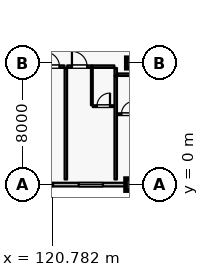
"""IFC4 building model, lengths in metres.
Left out: names, types, materials, properties, quantities, classifications, styles, units other than length and angle.
Written with IfcOpenShell. Run it as: python <this file> out.ifc"""

import sys

from ifc_helpers import new_model, si_unit, direction, frame, frame_2d, origin, origin_2d, place, context, subcontext, project, spatial, rectangle, extrude, element, fill, save


model = new_model("IFC4")
c1 = context("Model", 3, precision=1e-05, world=origin(), true_north=direction((0.0, 1.0)))
c2 = subcontext(c1, "Body", "Model", "MODEL_VIEW")
j1 = project(units=[si_unit("LENGTHUNIT", "METRE"), si_unit("PLANEANGLEUNIT", "RADIAN")], contexts=[c1])
p1 = place(None, origin())
s1 = spatial("IfcSite", under=j1, at=p1, CompositionType="ELEMENT")
p2 = place(p1, origin())
s2 = spatial("IfcBuilding", under=s1, at=p2, CompositionType="ELEMENT")
p3 = place(p2, frame((0.0, 0.0, 16.2)))
s3 = spatial("IfcBuildingStorey", under=s2, at=p3, CompositionType="ELEMENT", Elevation=16.2)
p4 = place(p3, frame((126.0, 0.0, 0.0), z_axis=(0.0, 0.0, 1.0), x_axis=(1.0, 0.0, 0.0)))
e1 = element("IfcColumn", 1, at=p4, inside=s3, PredefinedType="COLUMN", context=c2, shape_type="SweptSolid", body=[
    extrude(rectangle(XDim=0.8, YDim=0.8, at=origin_2d()), origin(), (0.0, 0.0, 1.0), 4.8),
])
p5 = place(p3, frame((126.0, 8.0, 0.0), z_axis=(0.0, 0.0, 1.0), x_axis=(1.0, 0.0, 0.0)))
e2 = element("IfcColumn", 2, at=p5, inside=s3, PredefinedType="COLUMN", context=c2, shape_type="SweptSolid", body=[
    extrude(rectangle(XDim=0.7, YDim=0.7, at=origin_2d()), origin(), (0.0, 0.0, 1.0), 4.8),
])
p6 = place(p3, frame((125.6, 0.0, 0.0), z_axis=(0.0, 0.0, 1.0), x_axis=(-1.0, 0.0, 0.0)))
e3 = element("IfcWall", 3, at=p6, inside=s3, PredefinedType="SOLIDWALL", context=c2, shape_type="SweptSolid", body=[
    extrude(rectangle(XDim=7.6, YDim=0.24, at=frame_2d((3.8, 0.0))), origin(), (0.0, 0.0, 1.0), 4.13),
])
p7 = place(p6, frame((1.48, 0.0, 0.8)))
e4 = element("IfcOpeningElement", 4, at=p7, cuts=e3, PredefinedType="OPENING", context=c2, shape_type="SweptSolid", body=[
    extrude(rectangle(XDim=1.6, YDim=1.6, at=frame_2d((0.8, 0.8))), frame((0.0, 0.13, 0.0), z_axis=(0.0, -1.0, 0.0), x_axis=(1.0, 0.0, 0.0)), (0.0, 0.0, 1.0), 0.26),
])
p8 = place(p6, frame((4.76, 0.0, 0.8)))
e5 = element("IfcOpeningElement", 5, at=p8, cuts=e3, PredefinedType="OPENING", context=c2, shape_type="SweptSolid", body=[
    extrude(rectangle(XDim=1.6, YDim=1.6, at=frame_2d((0.8, 0.8))), frame((0.0, 0.13, 0.0), z_axis=(0.0, -1.0, 0.0), x_axis=(1.0, 0.0, 0.0)), (0.0, 0.0, 1.0), 0.26),
])
p9 = place(p3, frame((119.97, 7.76, 0.0), z_axis=(0.0, 0.0, 1.0), x_axis=(1.0, 0.0, 0.0)))
e6 = element("IfcWall", 6, at=p9, inside=s3, PredefinedType="PARTITIONING", context=c2, shape_type="SweptSolid", body=[
    extrude(rectangle(XDim=1.62, YDim=0.16, at=frame_2d((0.81, 0.0))), origin(), (0.0, 0.0, 1.0), 4.535),
])
p10 = place(p9, frame((0.33, 0.0, 0.0)))
e7 = element("IfcOpeningElement", 7, at=p10, cuts=e6, PredefinedType="OPENING", context=c2, shape_type="SweptSolid", body=[
    extrude(rectangle(XDim=0.96, YDim=2.2, at=frame_2d((0.48, 1.1))), frame((0.0, 0.09, 0.0), z_axis=(0.0, -1.0, 0.0), x_axis=(1.0, 0.0, 0.0)), (0.0, 0.0, 1.0), 0.18),
])
p11 = place(p3, frame((121.77, 7.76, 0.0), z_axis=(0.0, 0.0, 1.0), x_axis=(1.0, 0.0, 0.0)))
e8 = element("IfcWall", 8, at=p11, inside=s3, PredefinedType="PARTITIONING", context=c2, shape_type="SweptSolid", body=[
    extrude(rectangle(XDim=1.62, YDim=0.16, at=frame_2d((0.81, 0.0))), origin(), (0.0, 0.0, 1.0), 4.535),
])
p12 = place(p11, frame((0.31, 0.0, 0.0)))
e9 = element("IfcOpeningElement", 9, at=p12, cuts=e8, PredefinedType="OPENING", context=c2, shape_type="SweptSolid", body=[
    extrude(rectangle(XDim=1.0, YDim=2.25, at=frame_2d((0.5, 1.125))), frame((0.0, 0.09, 0.0), z_axis=(0.0, -1.0, 0.0), x_axis=(1.0, 0.0, 0.0)), (0.0, 0.0, 1.0), 0.18),
])
p13 = place(p3, frame((123.4, 7.76, 0.0), z_axis=(0.0, 0.0, 1.0), x_axis=(1.0, 0.0, 0.0)))
e10 = element("IfcWall", 10, at=p13, inside=s3, PredefinedType="PARTITIONING", context=c2, shape_type="SweptSolid", body=[
    extrude(rectangle(XDim=1.47, YDim=0.16, at=frame_2d((0.735, 0.0))), origin(), (0.0, 0.0, 1.0), 4.535),
])
p14 = place(p3, frame((123.39, 5.22, 0.0), z_axis=(0.0, 0.0, 1.0), x_axis=(0.0, 1.0, 0.0)))
e11 = element("IfcWall", 11, at=p14, inside=s3, PredefinedType="PARTITIONING", context=c2, shape_type="SweptSolid", body=[
    extrude(rectangle(XDim=2.45, YDim=0.115, at=frame_2d((1.225, 0.0))), origin(), (0.0, 0.0, 1.0), 4.535),
])
p15 = place(p3, frame((123.45, 5.16, 0.0), z_axis=(0.0, 0.0, 1.0), x_axis=(1.0, 0.0, 0.0)))
e12 = element("IfcWall", 12, at=p15, inside=s3, PredefinedType="PARTITIONING", context=c2, shape_type="SweptSolid", body=[
    extrude(rectangle(XDim=1.41, YDim=0.115, at=frame_2d((0.705, 0.0))), origin(), (0.0, 0.0, 1.0), 4.535),
])
p16 = place(p15, frame((0.275, 0.0, 0.0)))
e13 = element("IfcOpeningElement", 13, at=p16, cuts=e12, PredefinedType="OPENING", context=c2, shape_type="SweptSolid", body=[
    extrude(rectangle(XDim=0.86, YDim=2.12, at=frame_2d((0.43, 1.06))), frame((0.0, 0.067, 0.0), z_axis=(0.0, -1.0, 0.0), x_axis=(1.0, 0.0, 0.0)), (0.0, 0.0, 1.0), 0.135),
])
p17 = place(p3, frame((121.68, 0.34, 0.0), z_axis=(0.0, 0.0, 1.0), x_axis=(0.0, 1.0, 0.0)))
e14 = element("IfcWall", 14, at=p17, inside=s3, PredefinedType="PARTITIONING", context=c2, shape_type="SweptSolid", body=[
    extrude(rectangle(XDim=7.33, YDim=0.16, at=frame_2d((3.665, 0.0))), origin(), (0.0, 0.0, 1.0), 4.535),
])
p18 = place(p3, frame((124.96, 7.15, 0.0), z_axis=(0.0, 0.0, 1.0), x_axis=(0.0, 1.0, 0.0)))
e15 = element("IfcWall", 15, at=p18, inside=s3, PredefinedType="PARTITIONING", context=c2, shape_type="SweptSolid", body=[
    extrude(rectangle(XDim=0.52, YDim=0.16, at=frame_2d((0.26, 0.0))), origin(), (0.0, 0.0, 1.0), 4.535),
])
p19 = place(p3, frame((125.05, 7.23, 0.0), z_axis=(0.0, 0.0, 1.0), x_axis=(1.0, 0.0, 0.0)))
e16 = element("IfcWall", 16, at=p19, inside=s3, PredefinedType="PARTITIONING", context=c2, shape_type="SweptSolid", body=[
    extrude(rectangle(XDim=1.47, YDim=0.16, at=frame_2d((0.735, 0.0))), origin(), (0.0, 0.0, 1.0), 4.535),
])
p20 = place(p3, frame((125.06, 4.63, 0.0), z_axis=(0.0, 0.0, 1.0), x_axis=(1.0, 0.0, 0.0)))
e17 = element("IfcWall", 17, at=p20, inside=s3, PredefinedType="PARTITIONING", context=c2, shape_type="SweptSolid", body=[
    extrude(rectangle(XDim=1.41, YDim=0.115, at=frame_2d((0.705, 0.0))), origin(), (0.0, 0.0, 1.0), 4.535),
])
p21 = place(p20, frame((0.275, 0.0, 0.0)))
e18 = element("IfcOpeningElement", 18, at=p21, cuts=e17, PredefinedType="OPENING", context=c2, shape_type="SweptSolid", body=[
    extrude(rectangle(XDim=0.86, YDim=2.12, at=frame_2d((0.43, 1.06))), frame((0.0, 0.067, 0.0), z_axis=(0.0, -1.0, 0.0), x_axis=(1.0, 0.0, 0.0)), (0.0, 0.0, 1.0), 0.135),
])
p22 = place(p3, frame((124.96, 0.34, 0.0), z_axis=(0.0, 0.0, 1.0), x_axis=(0.0, 1.0, 0.0)))
e19 = element("IfcWall", 19, at=p22, inside=s3, PredefinedType="PARTITIONING", context=c2, shape_type="SweptSolid", body=[
    extrude(rectangle(XDim=6.8, YDim=0.16, at=frame_2d((3.4, 0.0))), origin(), (0.0, 0.0, 1.0), 4.535),
])
p23 = place(p7, origin())
e20 = element("IfcWindow", 20, at=p23, inside=s3, PartitioningType="SINGLE_PANEL", PredefinedType="WINDOW", context=c2, shape_type="SweptSolid", body=[
    extrude(rectangle(XDim=1.6, YDim=1.6, at=frame_2d((0.8, 0.8))), frame((0.0, 0.03, 0.0), z_axis=(0.0, -1.0, 0.0), x_axis=(1.0, 0.0, 0.0)), (0.0, 0.0, 1.0), 0.06),
])
fill(e4, e20)
p24 = place(p8, origin())
e21 = element("IfcWindow", 21, at=p24, inside=s3, PartitioningType="SINGLE_PANEL", PredefinedType="WINDOW", context=c2, shape_type="SweptSolid", body=[
    extrude(rectangle(XDim=1.6, YDim=1.6, at=frame_2d((0.8, 0.8))), frame((0.0, 0.03, 0.0), z_axis=(0.0, -1.0, 0.0), x_axis=(1.0, 0.0, 0.0)), (0.0, 0.0, 1.0), 0.06),
])
fill(e5, e21)
p25 = place(p10, origin())
e22 = element("IfcDoor", 22, at=p25, inside=s3, OperationType="SINGLE_SWING_LEFT", PredefinedType="DOOR", context=c2, shape_type="SweptSolid", body=[
    extrude(rectangle(XDim=0.96, YDim=2.2, at=frame_2d((0.48, 1.1))), frame((0.0, 0.025, 0.0), z_axis=(0.0, -1.0, 0.0), x_axis=(1.0, 0.0, 0.0)), (0.0, 0.0, 1.0), 0.05),
])
fill(e7, e22)
p26 = place(p12, origin())
e23 = element("IfcDoor", 23, at=p26, inside=s3, OperationType="SINGLE_SWING_LEFT", PredefinedType="DOOR", context=c2, shape_type="SweptSolid", body=[
    extrude(rectangle(XDim=1.0, YDim=2.25, at=frame_2d((0.5, 1.125))), frame((0.0, 0.025, 0.0), z_axis=(0.0, -1.0, 0.0), x_axis=(1.0, 0.0, 0.0)), (0.0, 0.0, 1.0), 0.05),
])
fill(e9, e23)
p27 = place(p16, origin())
e24 = element("IfcDoor", 24, at=p27, inside=s3, OperationType="SINGLE_SWING_RIGHT", PredefinedType="DOOR", context=c2, shape_type="SweptSolid", body=[
    extrude(rectangle(XDim=0.86, YDim=2.12, at=frame_2d((0.43, 1.06))), frame((0.0, 0.025, 0.0), z_axis=(0.0, -1.0, 0.0), x_axis=(1.0, 0.0, 0.0)), (0.0, 0.0, 1.0), 0.05),
])
fill(e13, e24)
p28 = place(p21, origin())
e25 = element("IfcDoor", 25, at=p28, inside=s3, OperationType="SINGLE_SWING_RIGHT", PredefinedType="DOOR", context=c2, shape_type="SweptSolid", body=[
    extrude(rectangle(XDim=0.86, YDim=2.12, at=frame_2d((0.43, 1.06))), frame((0.0, 0.025, 0.0), z_axis=(0.0, -1.0, 0.0), x_axis=(1.0, 0.0, 0.0)), (0.0, 0.0, 1.0), 0.05),
])
fill(e18, e25)
save(model, sys.argv[1])
